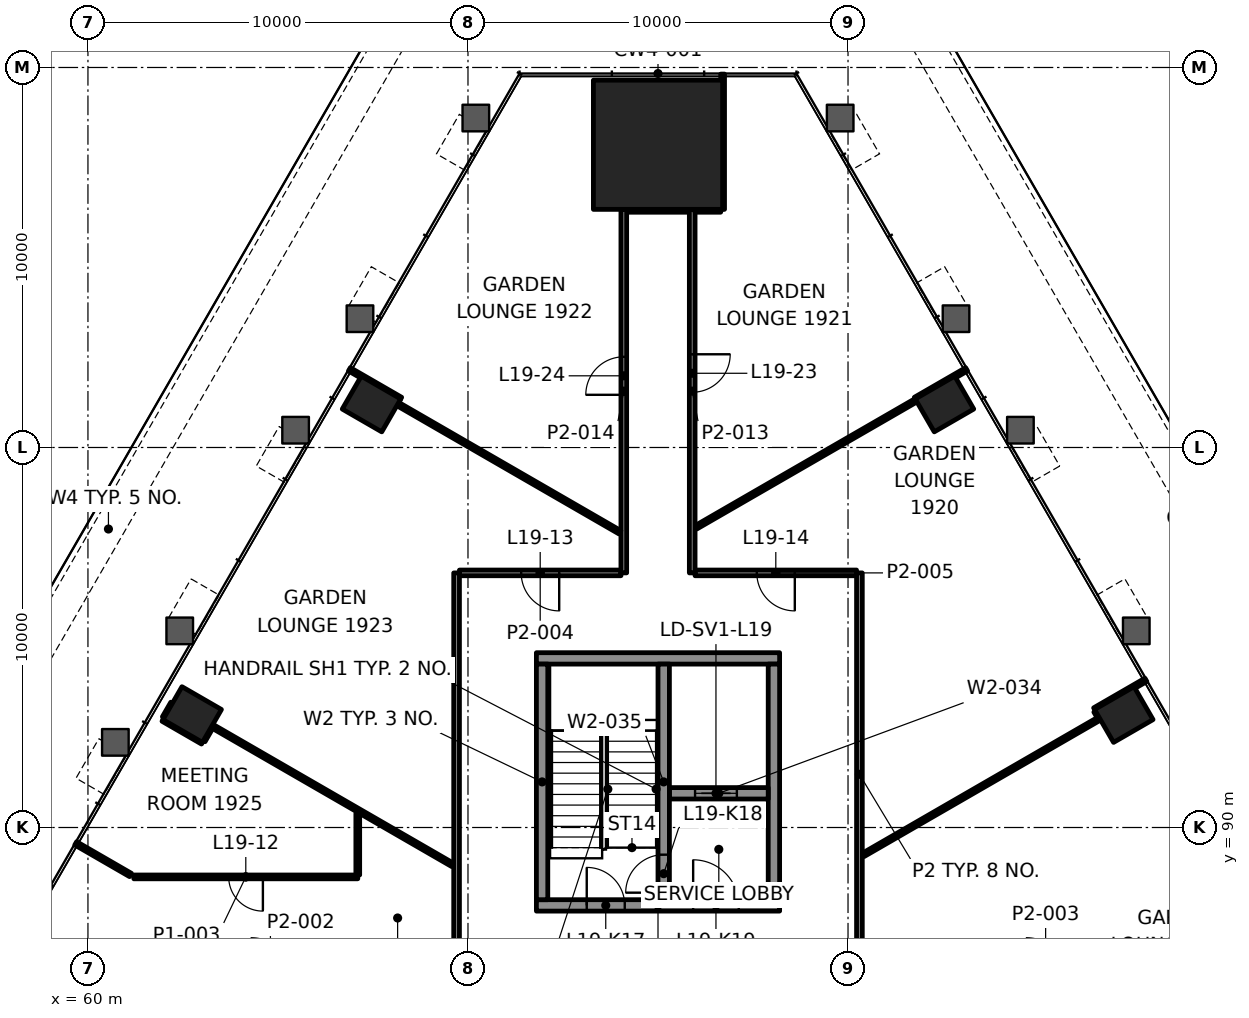
"""IFC4 building model, lengths in metres.
Left out: names, types, materials, properties, quantities, classifications, styles, units other than length and angle.
Written with IfcOpenShell. Run it as: python <this file> out.ifc"""

import sys

from ifc_helpers import new_model, si_unit, direction, frame, frame_2d, origin, origin_2d, place, context, subcontext, project, spatial, rectangle, extrude, element, fill, save


model = new_model("IFC4")
c1 = context("Model", 3, precision=1e-05, world=origin(), true_north=direction((0.0, 1.0)))
c2 = subcontext(c1, "Body", "Model", "MODEL_VIEW")
j1 = project(units=[si_unit("LENGTHUNIT", "METRE"), si_unit("PLANEANGLEUNIT", "RADIAN")], contexts=[c1])
p1 = place(None, origin())
s1 = spatial("IfcSite", under=j1, at=p1, CompositionType="ELEMENT")
p2 = place(p1, origin())
s2 = spatial("IfcBuilding", under=s1, at=p2, CompositionType="ELEMENT")
p3 = place(p2, frame((0.0, 0.0, 86.2)))
s3 = spatial("IfcBuildingStorey", under=s2, at=p3, CompositionType="ELEMENT", Elevation=86.2)
p4 = place(p3, frame((75.0, 107.966, 0.0), z_axis=(0.0, 0.0, 1.0), x_axis=(-1.0, 0.0, 0.0)))
e1 = element("IfcColumn", 1, at=p4, inside=s3, PredefinedType="COLUMN", context=c2, shape_type="SweptSolid", body=[
    extrude(rectangle(XDim=3.4, YDim=3.4, at=origin_2d()), origin(), (0.0, 0.0, 1.0), 4.2),
])
for number, where, z_axis, x_axis in (
    (2, (87.257, 92.972, -0.0), (0.0, 0.0, 1.0), (-0.5, 0.866, 0.0)),
    (3, (82.539, 101.144, -0.0), (0.0, 0.0, 1.0), (-0.5, 0.866, 0.0)),
    (4, (67.461, 101.144, -0.0), (0.0, 0.0, 1.0), (-0.5, -0.866, 0.0)),
    (5, (62.743, 92.972, -0.0), (0.0, 0.0, 1.0), (-0.5, -0.866, 0.0)),
):
    element("IfcColumn", number, at=place(p3, frame(where, z_axis=z_axis, x_axis=x_axis)), inside=s3, PredefinedType="COLUMN", context=c2, shape_type="SweptSolid", body=[
        extrude(rectangle(XDim=1.0, YDim=1.2, at=origin_2d()), origin(), (0.0, 0.0, 1.0), 4.2),
    ])
p5 = place(p3, frame((71.8, 87.95, 0.0), z_axis=(0.0, 0.0, 1.0), x_axis=(1.0, 0.0, 0.0)))
e6 = element("IfcWall", 6, at=p5, inside=s3, PredefinedType="SHEAR", context=c2, shape_type="SweptSolid", body=[
    extrude(rectangle(XDim=6.4, YDim=0.3, at=frame_2d((3.2, 0.0))), origin(), (0.0, 0.0, 1.0), 4.0),
])
p6 = place(p5, frame((1.325, 0.0, 0.0)))
e7 = element("IfcOpeningElement", 7, at=p6, cuts=e6, PredefinedType="OPENING", context=c2, shape_type="SweptSolid", body=[
    extrude(rectangle(XDim=1.0, YDim=2.1, at=frame_2d((0.5, 1.05))), frame((0.0, 0.16, 0.0), z_axis=(0.0, -1.0, 0.0), x_axis=(1.0, 0.0, 0.0)), (0.0, 0.0, 1.0), 0.32),
])
p7 = place(p5, frame((4.125, 0.0, 0.0)))
e8 = element("IfcOpeningElement", 8, at=p7, cuts=e6, PredefinedType="OPENING", context=c2, shape_type="SweptSolid", body=[
    extrude(rectangle(XDim=1.2, YDim=2.1, at=frame_2d((0.6, 1.05))), frame((0.0, 0.16, 0.0), z_axis=(0.0, -1.0, 0.0), x_axis=(1.0, 0.0, 0.0)), (0.0, 0.0, 1.0), 0.32),
])
p8 = place(p3, frame((71.8, 94.45, 0.0), z_axis=(0.0, 0.0, 1.0), x_axis=(1.0, 0.0, 0.0)))
e9 = element("IfcWall", 9, at=p8, inside=s3, PredefinedType="SHEAR", context=c2, shape_type="SweptSolid", body=[
    extrude(rectangle(XDim=6.4, YDim=0.3, at=frame_2d((3.2, 0.0))), origin(), (0.0, 0.0, 1.0), 4.0),
])
for number, where, z_axis, x_axis in (
    (10, (71.95, 88.1, 0.0), (0.0, 0.0, 1.0), (0.0, 1.0, 0.0)),
    (11, (78.05, 88.1, 0.0), (0.0, 0.0, 1.0), (0.0, 1.0, 0.0)),
):
    element("IfcWall", number, at=place(p3, frame(where, z_axis=z_axis, x_axis=x_axis)), inside=s3, PredefinedType="SHEAR", context=c2, shape_type="SweptSolid", body=[
        extrude(rectangle(XDim=6.2, YDim=0.3, at=frame_2d((3.1, 0.0))), origin(), (0.0, 0.0, 1.0), 4.0),
    ])
p9 = place(p3, frame((75.3, 90.9, 0.0), z_axis=(0.0, 0.0, 1.0), x_axis=(1.0, 0.0, 0.0)))
e12 = element("IfcWall", 12, at=p9, inside=s3, PredefinedType="SHEAR", context=c2, shape_type="SweptSolid", body=[
    extrude(rectangle(XDim=2.6, YDim=0.3, at=frame_2d((1.3, 0.0))), origin(), (0.0, 0.0, 1.0), 4.0),
])
p10 = place(p9, frame((0.675, 0.0, 0.0)))
e13 = element("IfcOpeningElement", 13, at=p10, cuts=e12, PredefinedType="OPENING", context=c2, shape_type="SweptSolid", body=[
    extrude(rectangle(XDim=1.1, YDim=2.1, at=frame_2d((0.55, 1.05))), frame((0.0, 0.16, 0.0), z_axis=(0.0, -1.0, 0.0), x_axis=(1.0, 0.0, 0.0)), (0.0, 0.0, 1.0), 0.32),
])
p11 = place(p3, frame((75.15, 88.1, 0.0), z_axis=(0.0, 0.0, 1.0), x_axis=(0.0, 1.0, 0.0)))
e14 = element("IfcWall", 14, at=p11, inside=s3, PredefinedType="SHEAR", context=c2, shape_type="SweptSolid", body=[
    extrude(rectangle(XDim=6.2, YDim=0.3, at=frame_2d((3.1, 0.0))), origin(), (0.0, 0.0, 1.0), 4.0),
])
p12 = place(p11, frame((0.185, 0.0, 0.0)))
e15 = element("IfcOpeningElement", 15, at=p12, cuts=e14, PredefinedType="OPENING", context=c2, shape_type="SweptSolid", body=[
    extrude(rectangle(XDim=1.0, YDim=2.1, at=frame_2d((0.5, 1.05))), frame((0.0, 0.16, 0.0), z_axis=(0.0, -1.0, 0.0), x_axis=(1.0, 0.0, 0.0)), (0.0, 0.0, 1.0), 0.32),
])
p13 = place(p3, frame((67.1, 88.7, 0.0), z_axis=(0.0, 0.0, 1.0), x_axis=(-1.0, 0.0, 0.0)))
e16 = element("IfcWall", 16, at=p13, inside=s3, PredefinedType="PARTITIONING", context=c2, shape_type="SweptSolid", body=[
    extrude(rectangle(XDim=5.893, YDim=0.1, at=frame_2d((2.947, 0.0))), origin(), (0.0, 0.0, 1.0), 3.4),
])
p14 = place(p13, frame((2.497, 0.0, 0.0)))
e17 = element("IfcOpeningElement", 17, at=p14, cuts=e16, PredefinedType="OPENING", context=c2, shape_type="SweptSolid", body=[
    extrude(rectangle(XDim=0.9, YDim=2.1, at=frame_2d((0.45, 1.05))), frame((0.0, 0.06, 0.0), z_axis=(0.0, -1.0, 0.0), x_axis=(1.0, 0.0, 0.0)), (0.0, 0.0, 1.0), 0.12),
])
p15 = place(p3, frame((74.025, 96.7, 0.0), z_axis=(0.0, 0.0, 1.0), x_axis=(-1.0, 0.0, 0.0)))
e18 = element("IfcWall", 18, at=p15, inside=s3, PredefinedType="PARTITIONING", context=c2, shape_type="SweptSolid", body=[
    extrude(rectangle(XDim=4.25, YDim=0.15, at=frame_2d((2.125, 0.0))), origin(), (0.0, 0.0, 1.0), 3.4),
])
p16 = place(p15, frame((1.625, 0.0, 0.0)))
e19 = element("IfcOpeningElement", 19, at=p16, cuts=e18, PredefinedType="OPENING", context=c2, shape_type="SweptSolid", body=[
    extrude(rectangle(XDim=1.0, YDim=2.1, at=frame_2d((0.5, 1.05))), frame((0.0, 0.085, 0.0), z_axis=(0.0, -1.0, 0.0), x_axis=(1.0, 0.0, 0.0)), (0.0, 0.0, 1.0), 0.17),
])
p17 = place(p3, frame((80.225, 96.7, 0.0), z_axis=(0.0, 0.0, 1.0), x_axis=(-1.0, 0.0, 0.0)))
e20 = element("IfcWall", 20, at=p17, inside=s3, PredefinedType="PARTITIONING", context=c2, shape_type="SweptSolid", body=[
    extrude(rectangle(XDim=4.25, YDim=0.15, at=frame_2d((2.125, 0.0))), origin(), (0.0, 0.0, 1.0), 3.4),
])
p18 = place(p17, frame((1.625, 0.0, 0.0)))
e21 = element("IfcOpeningElement", 21, at=p18, cuts=e20, PredefinedType="OPENING", context=c2, shape_type="SweptSolid", body=[
    extrude(rectangle(XDim=1.0, YDim=2.1, at=frame_2d((0.5, 1.05))), frame((0.0, 0.085, 0.0), z_axis=(0.0, -1.0, 0.0), x_axis=(1.0, 0.0, 0.0)), (0.0, 0.0, 1.0), 0.17),
])
p19 = place(p3, frame((74.176, 106.266, 0.0), z_axis=(0.0, 0.0, 1.0), x_axis=(1.0, 0.0, 0.0)))
e22 = element("IfcWall", 22, at=p19, inside=s3, PredefinedType="PARTITIONING", context=c2, shape_type="SweptSolid", body=[
    extrude(rectangle(XDim=1.649, YDim=0.15, at=frame_2d((0.825, 0.0))), origin(), (0.0, 0.0, 1.0), 3.397),
])
p20 = place(p3, frame((80.401, 89.28, 0.0), z_axis=(0.0, 0.0, 1.0), x_axis=(0.866017489163, 0.500013708276, 0.0)))
e23 = element("IfcWall", 23, at=p20, inside=s3, PredefinedType="PARTITIONING", context=c2, shape_type="SweptSolid", body=[
    extrude(rectangle(XDim=7.183, YDim=0.1, at=frame_2d((3.592, 0.0))), origin(), (0.0, 0.0, 1.0), 3.4),
])
p21 = place(p3, frame((86.488, 93.105, 0.0), z_axis=(0.0, 0.0, 1.0), x_axis=(0.866018739521, 0.500011542666, 0.0)))
e24 = element("IfcWall", 24, at=p21, inside=s3, PredefinedType="PARTITIONING", context=c2, shape_type="SweptSolid", body=[
    extrude(rectangle(XDim=1.56, YDim=0.1, at=frame_2d((0.78, 0.0))), origin(), (0.0, 0.0, 1.0), 3.165),
])
p22 = place(p3, frame((76.001, 97.901, 0.0), z_axis=(0.0, 0.0, 1.0), x_axis=(0.866029244915, 0.499993346908, 0.0)))
e25 = element("IfcWall", 25, at=p22, inside=s3, PredefinedType="PARTITIONING", context=c2, shape_type="SweptSolid", body=[
    extrude(rectangle(XDim=6.683, YDim=0.1, at=frame_2d((3.342, 0.0))), origin(), (0.0, 0.0, 1.0), 3.4),
])
p23 = place(p3, frame((81.769, 101.277, 0.0), z_axis=(0.0, 0.0, 1.0), x_axis=(0.866029224906, 0.499993381564, 0.0)))
e26 = element("IfcWall", 26, at=p23, inside=s3, PredefinedType="PARTITIONING", context=c2, shape_type="SweptSolid", body=[
    extrude(rectangle(XDim=1.56, YDim=0.1, at=frame_2d((0.78, 0.0))), origin(), (0.0, 0.0, 1.0), 3.4),
])
p24 = place(p3, frame((63.038, 92.283, 0.0), z_axis=(0.0, 0.0, 1.0), x_axis=(0.500246304613, 0.865883153041, 0.0)))
e27 = element("IfcWall", 27, at=p24, inside=s3, PredefinedType="PARTITIONING", context=c2, shape_type="SweptSolid", body=[
    extrude(rectangle(XDim=0.39, YDim=0.1, at=frame_2d((0.195, 0.0))), origin(), (0.0, 0.0, 1.0), 3.322),
])
p25 = place(p3, frame((62.002, 92.889, 0.0), z_axis=(0.0, 0.0, 1.0), x_axis=(0.4997542532, 0.866167239284, 0.0)))
e28 = element("IfcWall", 28, at=p25, inside=s3, PredefinedType="PARTITIONING", context=c2, shape_type="SweptSolid", body=[
    extrude(rectangle(XDim=0.443, YDim=0.1, at=frame_2d((0.222, 0.0))), origin(), (0.0, 0.0, 1.0), 3.4),
])
p26 = place(p3, frame((80.3, 86.1, 0.0), z_axis=(0.0, 0.0, 1.0), x_axis=(0.0, 1.0, 0.0)))
e29 = element("IfcWall", 29, at=p26, inside=s3, PredefinedType="PARTITIONING", context=c2, shape_type="SweptSolid", body=[
    extrude(rectangle(XDim=10.599, YDim=0.15, at=frame_2d((5.3, 0.0))), origin(), (0.0, 0.0, 1.0), 3.322),
])
p27 = place(p3, frame((76.7, 106.267, 0.0), z_axis=(0.0, 0.0, 1.0), x_axis=(0.0, 1.0, 0.0)))
e30 = element("IfcWall", 30, at=p27, inside=s3, PredefinedType="PARTITIONING", context=c2, shape_type="SweptSolid", body=[
    extrude(rectangle(XDim=3.56, YDim=0.1, at=frame_2d((1.78, 0.0))), origin(), (0.0, 0.0, 1.0), 3.4),
])
p28 = place(p3, frame((75.9, 106.266, 0.0), z_axis=(0.0, 0.0, 1.0), x_axis=(0.0, -1.0, 0.0)))
e31 = element("IfcWall", 31, at=p28, inside=s3, PredefinedType="PARTITIONING", context=c2, shape_type="SweptSolid", body=[
    extrude(rectangle(XDim=9.566, YDim=0.15, at=frame_2d((4.783, 0.0))), origin(), (0.0, 0.0, 1.0), 3.4),
])
p29 = place(p28, frame((3.813, 0.0, 0.0)))
e32 = element("IfcOpeningElement", 32, at=p29, cuts=e31, PredefinedType="OPENING", context=c2, shape_type="SweptSolid", body=[
    extrude(rectangle(XDim=1.0, YDim=2.1, at=frame_2d((0.5, 1.05))), frame((0.0, 0.085, 0.0), z_axis=(0.0, -1.0, 0.0), x_axis=(1.0, 0.0, 0.0)), (0.0, 0.0, 1.0), 0.17),
])
p30 = place(p3, frame((74.1, 96.7, 0.0), z_axis=(0.0, 0.0, 1.0), x_axis=(0.0, 1.0, 0.0)))
e33 = element("IfcWall", 33, at=p30, inside=s3, PredefinedType="PARTITIONING", context=c2, shape_type="SweptSolid", body=[
    extrude(rectangle(XDim=9.566, YDim=0.15, at=frame_2d((4.783, 0.0))), origin(), (0.0, 0.0, 1.0), 3.4),
])
p31 = place(p30, frame((4.686, 0.0, 0.0)))
e34 = element("IfcOpeningElement", 34, at=p31, cuts=e33, PredefinedType="OPENING", context=c2, shape_type="SweptSolid", body=[
    extrude(rectangle(XDim=1.0, YDim=2.1, at=frame_2d((0.5, 1.05))), frame((0.0, 0.085, 0.0), z_axis=(0.0, -1.0, 0.0), x_axis=(1.0, 0.0, 0.0)), (0.0, 0.0, 1.0), 0.17),
])
p32 = place(p3, frame((69.7, 86.1, 0.0), z_axis=(0.0, 0.0, 1.0), x_axis=(0.0, 1.0, 0.0)))
e35 = element("IfcWall", 35, at=p32, inside=s3, PredefinedType="PARTITIONING", context=c2, shape_type="SweptSolid", body=[
    extrude(rectangle(XDim=10.599, YDim=0.15, at=frame_2d((5.3, 0.0))), origin(), (0.0, 0.0, 1.0), 3.322),
])
p33 = place(p3, frame((67.1, 88.75, 0.0), z_axis=(0.0, 0.0, 1.0), x_axis=(0.0, 1.0, 0.0)))
e36 = element("IfcWall", 36, at=p33, inside=s3, PredefinedType="PARTITIONING", context=c2, shape_type="SweptSolid", body=[
    extrude(rectangle(XDim=1.619, YDim=0.1, at=frame_2d((0.81, 0.0))), origin(), (0.0, 0.0, 1.0), 3.322),
])
p34 = place(p3, frame((86.597, 92.915, 0.0), z_axis=(0.0, 0.0, 1.0), x_axis=(-0.500013496215, 0.866017611601, 0.0)))
e37 = element("IfcWall", 37, at=p34, inside=s3, PredefinedType="PARTITIONING", context=c2, shape_type="SweptSolid", body=[
    extrude(rectangle(XDim=0.169, YDim=0.1, at=frame_2d((0.085, 0.0))), origin(), (0.0, 0.0, 1.0), 3.4),
])
p35 = place(p3, frame((68.23, 101.277, 0.0), z_axis=(0.0, 0.0, 1.0), x_axis=(-0.866018739521, 0.500011542666, 0.0)))
e38 = element("IfcWall", 38, at=p35, inside=s3, PredefinedType="PARTITIONING", context=c2, shape_type="SweptSolid", body=[
    extrude(rectangle(XDim=1.56, YDim=0.1, at=frame_2d((0.78, 0.0))), origin(), (0.0, 0.0, 1.0), 3.4),
])
p36 = place(p3, frame((73.999, 97.768, 0.0), z_axis=(0.0, 0.0, 1.0), x_axis=(-0.866030773134, 0.499990699898, 0.0)))
e39 = element("IfcWall", 39, at=p36, inside=s3, PredefinedType="PARTITIONING", context=c2, shape_type="SweptSolid", body=[
    extrude(rectangle(XDim=6.749, YDim=0.1, at=frame_2d((3.375, 0.0))), origin(), (0.0, 0.0, 1.0), 3.4),
])
p37 = place(p3, frame((69.599, 89.014, 0.0), z_axis=(0.0, 0.0, 1.0), x_axis=(-0.866016649877, 0.500015161905, 0.0)))
e40 = element("IfcWall", 40, at=p37, inside=s3, PredefinedType="PARTITIONING", context=c2, shape_type="SweptSolid", body=[
    extrude(rectangle(XDim=7.316, YDim=0.1, at=frame_2d((3.658, 0.0))), origin(), (0.0, 0.0, 1.0), 3.322),
])
p38 = place(p3, frame((63.013, 92.239, 0.0), z_axis=(0.0, 0.0, 1.0), x_axis=(-0.866006032174, 0.500033551112, 0.0)))
e41 = element("IfcWall", 41, at=p38, inside=s3, PredefinedType="PARTITIONING", context=c2, shape_type="SweptSolid", body=[
    extrude(rectangle(XDim=1.2, YDim=0.1, at=frame_2d((0.6, 0.0))), origin(), (0.0, 0.0, 1.0), 3.165),
])
p39 = place(p3, frame((61.12, 88.75, 0.0), z_axis=(0.0, 0.0, 1.0), x_axis=(-0.865961000814, 0.50011153263, 0.0)))
e42 = element("IfcWall", 42, at=p39, inside=s3, PredefinedType="PARTITIONING", context=c2, shape_type="SweptSolid", body=[
    extrude(rectangle(XDim=1.666, YDim=0.1, at=frame_2d((0.833, 0.0))), origin(), (0.0, 0.0, 1.0), 3.165),
])
p40 = place(p3, frame((75.975, 106.266, 0.0), z_axis=(0.0, 0.0, 1.0), x_axis=(1.0, 0.0, 0.0)))
e43 = element("IfcWall", 43, at=p40, inside=s3, PredefinedType="PARTITIONING", context=c2, shape_type="SweptSolid", body=[
    extrude(rectangle(XDim=0.674, YDim=0.15, at=frame_2d((0.337, 0.0))), origin(), (0.0, 0.0, 1.0), 3.4),
])
p41 = place(p3, frame((94.539, 89.06, 0.0), z_axis=(0.0, 0.0, 1.0), x_axis=(-0.499999217398, 0.866025855619, 0.0)))
e44 = element("IfcWall", 44, at=p41, inside=s3, PredefinedType="SOLIDWALL", context=c2, shape_type="SweptSolid", body=[
    extrude(rectangle(XDim=27.311, YDim=0.8, at=frame_2d((13.656, 0.0))), origin(), (0.0, 0.0, 1.0), 0.9),
])
p42 = place(p3, frame((69.117, 112.712, 0.0), z_axis=(0.0, 0.0, 1.0), x_axis=(-0.499998392273, -0.866026332004, 0.0)))
e45 = element("IfcWall", 45, at=p42, inside=s3, PredefinedType="SOLIDWALL", context=c2, shape_type="SweptSolid", body=[
    extrude(rectangle(XDim=34.311, YDim=0.8, at=frame_2d((17.156, 0.0))), origin(), (0.0, 0.0, 1.0), 0.9),
])
p43 = place(p14, origin())
e46 = element("IfcDoor", 46, at=p43, inside=s3, OperationType="SINGLE_SWING_LEFT", PredefinedType="DOOR", context=c2, shape_type="SweptSolid", body=[
    extrude(rectangle(XDim=0.9, YDim=2.1, at=frame_2d((0.45, 1.05))), frame((0.0, 0.025, 0.0), z_axis=(0.0, -1.0, 0.0), x_axis=(1.0, 0.0, 0.0)), (0.0, 0.0, 1.0), 0.05),
])
fill(e17, e46)
p44 = place(p16, origin())
e47 = element("IfcDoor", 47, at=p44, inside=s3, OperationType="SINGLE_SWING_LEFT", PredefinedType="DOOR", context=c2, shape_type="SweptSolid", body=[
    extrude(rectangle(XDim=1.0, YDim=2.1, at=frame_2d((0.5, 1.05))), frame((0.0, 0.025, 0.0), z_axis=(0.0, -1.0, 0.0), x_axis=(1.0, 0.0, 0.0)), (0.0, 0.0, 1.0), 0.05),
])
fill(e19, e47)
p45 = place(p18, origin())
e48 = element("IfcDoor", 48, at=p45, inside=s3, OperationType="SINGLE_SWING_RIGHT", PredefinedType="DOOR", context=c2, shape_type="SweptSolid", body=[
    extrude(rectangle(XDim=1.0, YDim=2.1, at=frame_2d((0.5, 1.05))), frame((0.0, 0.025, 0.0), z_axis=(0.0, -1.0, 0.0), x_axis=(1.0, 0.0, 0.0)), (0.0, 0.0, 1.0), 0.05),
])
fill(e21, e48)
p46 = place(p29, origin())
e49 = element("IfcDoor", 49, at=p46, inside=s3, OperationType="SINGLE_SWING_LEFT", PredefinedType="DOOR", context=c2, shape_type="SweptSolid", body=[
    extrude(rectangle(XDim=1.0, YDim=2.1, at=frame_2d((0.5, 1.05))), frame((0.0, 0.025, 0.0), z_axis=(0.0, -1.0, 0.0), x_axis=(1.0, 0.0, 0.0)), (0.0, 0.0, 1.0), 0.05),
])
fill(e32, e49)
p47 = place(p31, origin())
e50 = element("IfcDoor", 50, at=p47, inside=s3, OperationType="SINGLE_SWING_LEFT", PredefinedType="DOOR", context=c2, shape_type="SweptSolid", body=[
    extrude(rectangle(XDim=1.0, YDim=2.1, at=frame_2d((0.5, 1.05))), frame((0.0, 0.025, 0.0), z_axis=(0.0, -1.0, 0.0), x_axis=(1.0, 0.0, 0.0)), (0.0, 0.0, 1.0), 0.05),
])
fill(e34, e50)
p48 = place(p10, origin())
e51 = element("IfcDoor", 51, at=p48, inside=s3, OperationType="DOUBLE_DOOR_SLIDING", PredefinedType="DOOR", context=c2, shape_type="SweptSolid", body=[
    extrude(rectangle(XDim=1.1, YDim=2.1, at=frame_2d((0.55, 1.05))), frame((0.0, 0.025, 0.0), z_axis=(0.0, -1.0, 0.0), x_axis=(1.0, 0.0, 0.0)), (0.0, 0.0, 1.0), 0.05),
])
fill(e13, e51)
p49 = place(p6, origin())
e52 = element("IfcDoor", 52, at=p49, inside=s3, OperationType="SINGLE_SWING_RIGHT", PredefinedType="DOOR", context=c2, shape_type="SweptSolid", body=[
    extrude(rectangle(XDim=1.0, YDim=2.1, at=frame_2d((0.5, 1.05))), frame((0.0, 0.025, 0.0), z_axis=(0.0, -1.0, 0.0), x_axis=(1.0, 0.0, 0.0)), (0.0, 0.0, 1.0), 0.05),
])
fill(e7, e52)
p50 = place(p12, origin())
e53 = element("IfcDoor", 53, at=p50, inside=s3, OperationType="SINGLE_SWING_LEFT", PredefinedType="DOOR", context=c2, shape_type="SweptSolid", body=[
    extrude(rectangle(XDim=1.0, YDim=2.1, at=frame_2d((0.5, 1.05))), frame((0.0, 0.025, 0.0), z_axis=(0.0, -1.0, 0.0), x_axis=(1.0, 0.0, 0.0)), (0.0, 0.0, 1.0), 0.05),
])
fill(e15, e53)
p51 = place(p7, origin())
e54 = element("IfcDoor", 54, at=p51, inside=s3, OperationType="SINGLE_SWING_RIGHT", PredefinedType="DOOR", context=c2, shape_type="SweptSolid", body=[
    extrude(rectangle(XDim=1.2, YDim=2.1, at=frame_2d((0.6, 1.05))), frame((0.0, 0.025, 0.0), z_axis=(0.0, -1.0, 0.0), x_axis=(1.0, 0.0, 0.0)), (0.0, 0.0, 1.0), 0.05),
])
fill(e8, e54)
save(model, sys.argv[1])
